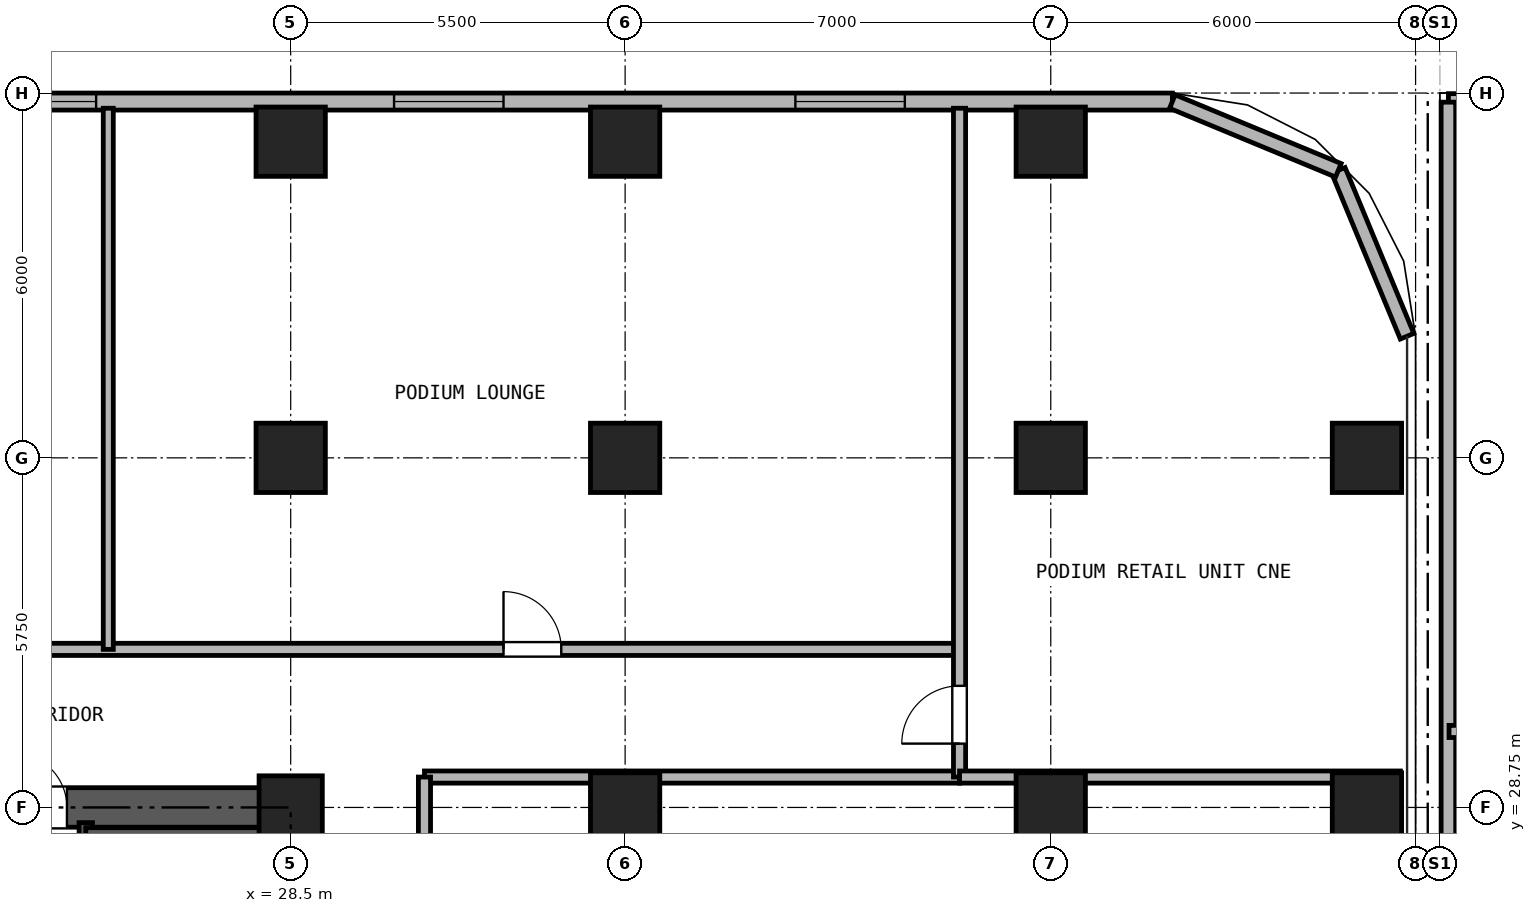
"""IFC4 building model, lengths in metres.
Left out: names, types, materials, properties, quantities, classifications, styles, units other than length and angle.
Written with IfcOpenShell. Run it as: python <this file> out.ifc"""

import sys

from ifc_helpers import new_model, si_unit, direction, frame, frame_2d, origin, origin_2d, place, context, subcontext, project, spatial, rectangle, hollow_rectangle, extrude, source, transform, mapped, element, fill, save


model = new_model("IFC4")
c1 = context("Model", 3, precision=1e-05, world=origin(), true_north=direction((0.0, 1.0)))
c2 = subcontext(c1, "Body", "Model", "MODEL_VIEW")
j1 = project(units=[si_unit("LENGTHUNIT", "METRE"), si_unit("PLANEANGLEUNIT", "RADIAN")], contexts=[c1])
p1 = place(None, origin())
s1 = spatial("IfcSite", under=j1, at=p1, CompositionType="ELEMENT")
p2 = place(p1, origin())
s2 = spatial("IfcBuilding", under=s1, at=p2, CompositionType="ELEMENT")
p3 = place(p2, frame((0.0, 0.0, 4.5)))
s3 = spatial("IfcBuildingStorey", under=s2, at=p3, CompositionType="ELEMENT", Elevation=4.5)
m1 = source(origin(), c2, "Body", "SweptSolid", [
    extrude(hollow_rectangle(XDim=1.14, YDim=1.14, WallThickness=0.07, at=origin_2d()), origin(), (0.0, 0.0, 1.0), 4.18),
])
for number, where, z_axis, x_axis in (
    (1, (28.5, 39.7, 0.0), (0.0, 0.0, 1.0), (1.0, 0.0, 0.0)),
    (2, (34.0, 39.7, 0.0), (0.0, 0.0, 1.0), (1.0, 0.0, 0.0)),
    (3, (41.0, 39.7, 0.0), (0.0, 0.0, 1.0), (1.0, 0.0, 0.0)),
    (4, (46.2, 28.75, 0.0), (0.0, 0.0, 1.0), (1.0, 0.0, 0.0)),
    (5, (46.2, 34.5, 0.0), (0.0, 0.0, 1.0), (1.0, 0.0, 0.0)),
):
    element("IfcColumn", number, at=place(p3, frame(where, z_axis=z_axis, x_axis=x_axis)), inside=s3, PredefinedType="COLUMN", context=c2, shape_type="MappedRepresentation", body=[
        mapped(m1, transform((0.0, 0.0, 0.0), x_axis=(1.0, 0.0, 0.0), y_axis=(0.0, 1.0, 0.0), z_axis=(0.0, 0.0, 1.0), scale=1.0)),
    ])
m2 = source(origin(), c2, "Body", "SweptSolid", [
    extrude(hollow_rectangle(XDim=1.04, YDim=1.04, WallThickness=0.065, at=origin_2d()), origin(), (0.0, 0.0, 1.0), 4.18),
])
p4 = place(p3, frame((28.5, 28.75, 0.0), z_axis=(0.0, 0.0, 1.0), x_axis=(1.0, 0.0, 0.0)))
e6 = element("IfcColumn", 6, at=p4, inside=s3, PredefinedType="COLUMN", context=c2, shape_type="MappedRepresentation", body=[
    mapped(m2, transform((0.0, 0.0, 0.0), x_axis=(1.0, 0.0, 0.0), y_axis=(0.0, 1.0, 0.0), z_axis=(0.0, 0.0, 1.0), scale=1.0)),
])
for number, where, z_axis, x_axis in (
    (7, (28.5, 34.5, 0.0), (0.0, 0.0, 1.0), (1.0, 0.0, 0.0)),
    (8, (34.0, 28.75, 0.0), (0.0, 0.0, 1.0), (1.0, 0.0, 0.0)),
    (9, (34.0, 34.5, 0.0), (0.0, 0.0, 1.0), (1.0, 0.0, 0.0)),
    (10, (41.0, 28.75, 0.0), (0.0, 0.0, 1.0), (1.0, 0.0, 0.0)),
    (11, (41.0, 34.5, 0.0), (0.0, 0.0, 1.0), (1.0, 0.0, 0.0)),
):
    element("IfcColumn", number, at=place(p3, frame(where, z_axis=z_axis, x_axis=x_axis)), inside=s3, PredefinedType="COLUMN", context=c2, shape_type="MappedRepresentation", body=[
        mapped(m1, transform((0.0, 0.0, 0.0), x_axis=(1.0, 0.0, 0.0), y_axis=(0.0, 1.0, 0.0), z_axis=(0.0, 0.0, 1.0), scale=1.0)),
    ])
p5 = place(p3, frame((4.0, 40.36, 0.0), z_axis=(0.0, 0.0, 1.0), x_axis=(1.0, 0.0, 0.0)))
e12 = element("IfcWall", 12, at=p5, inside=s3, PredefinedType="SOLIDWALL", context=c2, shape_type="SweptSolid", body=[
    extrude(rectangle(XDim=39.0, YDim=0.28, at=frame_2d((19.5, 0.0))), origin(), (0.0, 0.0, 1.0), 4.18),
])
p6 = place(p5, frame((4.0, 0.0, 0.9)))
e13 = element("IfcOpeningElement", 13, at=p6, cuts=e12, PredefinedType="OPENING", context=c2, shape_type="SweptSolid", body=[
    extrude(rectangle(XDim=1.8, YDim=2.1, at=frame_2d((0.9, 1.05))), frame((0.0, 0.15, 0.0), z_axis=(0.0, -1.0, 0.0), x_axis=(1.0, 0.0, 0.0)), (0.0, 0.0, 1.0), 0.3),
])
p7 = place(p5, frame((11.2, 0.0, 0.9)))
e14 = element("IfcOpeningElement", 14, at=p7, cuts=e12, PredefinedType="OPENING", context=c2, shape_type="SweptSolid", body=[
    extrude(rectangle(XDim=1.8, YDim=2.1, at=frame_2d((0.9, 1.05))), frame((0.0, 0.15, 0.0), z_axis=(0.0, -1.0, 0.0), x_axis=(1.0, 0.0, 0.0)), (0.0, 0.0, 1.0), 0.3),
])
p8 = place(p5, frame((19.5, 0.0, 0.9)))
e15 = element("IfcOpeningElement", 15, at=p8, cuts=e12, PredefinedType="OPENING", context=c2, shape_type="SweptSolid", body=[
    extrude(rectangle(XDim=1.8, YDim=2.1, at=frame_2d((0.9, 1.05))), frame((0.0, 0.15, 0.0), z_axis=(0.0, -1.0, 0.0), x_axis=(1.0, 0.0, 0.0)), (0.0, 0.0, 1.0), 0.3),
])
p9 = place(p5, frame((26.2, 0.0, 0.9)))
e16 = element("IfcOpeningElement", 16, at=p9, cuts=e12, PredefinedType="OPENING", context=c2, shape_type="SweptSolid", body=[
    extrude(rectangle(XDim=1.8, YDim=2.1, at=frame_2d((0.9, 1.05))), frame((0.0, 0.15, 0.0), z_axis=(0.0, -1.0, 0.0), x_axis=(1.0, 0.0, 0.0)), (0.0, 0.0, 1.0), 0.3),
])
p10 = place(p5, frame((32.8, 0.0, 0.9)))
e17 = element("IfcOpeningElement", 17, at=p10, cuts=e12, PredefinedType="OPENING", context=c2, shape_type="SweptSolid", body=[
    extrude(rectangle(XDim=1.8, YDim=2.1, at=frame_2d((0.9, 1.05))), frame((0.0, 0.15, 0.0), z_axis=(0.0, -1.0, 0.0), x_axis=(1.0, 0.0, 0.0)), (0.0, 0.0, 1.0), 0.3),
])
for number, where, z_axis, x_axis in (
    (18, (46.86, 36.5, 0.0), (0.0, 0.0, 1.0), (-0.383, 0.924, 0.0)),
    (19, (45.729, 39.229, 0.0), (0.0, 0.0, 1.0), (-0.924, 0.383, 0.0)),
):
    element("IfcWall", number, at=place(p3, frame(where, z_axis=z_axis, x_axis=x_axis)), inside=s3, PredefinedType="SOLIDWALL", context=c2, shape_type="SweptSolid", body=[
        extrude(rectangle(XDim=2.954, YDim=0.24, at=frame_2d((1.477, 0.0))), origin(), (0.0, 0.0, 1.0), 4.18),
    ])
p11 = place(p3, frame((47.54, 40.35, 0.0), z_axis=(0.0, 0.0, 1.0), x_axis=(1.0, 0.0, 0.0)))
e20 = element("IfcWall", 20, at=p11, inside=s3, PredefinedType="SOLIDWALL", context=c2, shape_type="SweptSolid", body=[
    extrude(rectangle(XDim=23.91, YDim=0.28, at=frame_2d((11.955, 0.0))), origin(), (0.0, 0.0, 1.0), 4.18),
])
p12 = place(p11, frame((6.01, 0.0, 1.1)))
e21 = element("IfcOpeningElement", 21, at=p12, cuts=e20, PredefinedType="OPENING", context=c2, shape_type="SweptSolid", body=[
    extrude(rectangle(XDim=0.9, YDim=1.5, at=frame_2d((0.45, 0.75))), frame((0.0, 0.15, 0.0), z_axis=(0.0, -1.0, 0.0), x_axis=(1.0, 0.0, 0.0)), (0.0, 0.0, 1.0), 0.3),
])
p13 = place(p3, frame((47.54, -0.54, 0.0), z_axis=(0.0, 0.0, 1.0), x_axis=(0.0, 1.0, 0.0)))
e22 = element("IfcWall", 22, at=p13, inside=s3, PredefinedType="SOLIDWALL", context=c2, shape_type="SweptSolid", body=[
    extrude(rectangle(XDim=40.89, YDim=0.24, at=frame_2d((20.445, 0.0))), origin(), (0.0, 0.0, 1.0), 4.18),
])
p14 = place(p3, frame((18.175, 28.75, 0.0), z_axis=(0.0, 0.0, 1.0), x_axis=(1.0, 0.0, 0.0)))
e23 = element("IfcWall", 23, at=p14, inside=s3, PredefinedType="SHEAR", context=c2, shape_type="SweptSolid", body=[
    extrude(rectangle(XDim=10.65, YDim=0.65, at=frame_2d((5.325, 0.0))), origin(), (0.0, 0.0, 1.0), 4.18),
])
p15 = place(p14, frame((4.205, 0.0, 0.0)))
e24 = element("IfcOpeningElement", 24, at=p15, cuts=e23, PredefinedType="OPENING", context=c2, shape_type="SweptSolid", body=[
    extrude(rectangle(XDim=0.9, YDim=2.05, at=frame_2d((0.45, 1.025))), frame((0.0, 0.335, 0.0), z_axis=(0.0, -1.0, 0.0), x_axis=(1.0, 0.0, 0.0)), (0.0, 0.0, 1.0), 0.67),
])
p16 = place(p14, frame((5.745, 0.0, 0.0)))
e25 = element("IfcOpeningElement", 25, at=p16, cuts=e23, PredefinedType="OPENING", context=c2, shape_type="SweptSolid", body=[
    extrude(rectangle(XDim=0.9, YDim=2.05, at=frame_2d((0.45, 1.025))), frame((0.0, 0.335, 0.0), z_axis=(0.0, -1.0, 0.0), x_axis=(1.0, 0.0, 0.0)), (0.0, 0.0, 1.0), 0.67),
])
p17 = place(p3, frame((28.5, 11.825, 0.0), z_axis=(0.0, 0.0, 1.0), x_axis=(0.0, 1.0, 0.0)))
e26 = element("IfcWall", 26, at=p17, inside=s3, PredefinedType="SHEAR", context=c2, shape_type="SweptSolid", body=[
    extrude(rectangle(XDim=16.6, YDim=0.65, at=frame_2d((8.3, 0.0))), origin(), (0.0, 0.0, 1.0), 4.18),
])
p18 = place(p17, frame((7.325, 0.0, 0.0)))
e27 = element("IfcOpeningElement", 27, at=p18, cuts=e26, PredefinedType="OPENING", context=c2, shape_type="SweptSolid", body=[
    extrude(rectangle(XDim=1.15, YDim=2.2, at=frame_2d((0.575, 1.1))), frame((0.0, 0.335, 0.0), z_axis=(0.0, -1.0, 0.0), x_axis=(1.0, 0.0, 0.0)), (0.0, 0.0, 1.0), 0.67),
])
p19 = place(p3, frame((25.13, 21.39, 0.0), z_axis=(0.0, 0.0, 1.0), x_axis=(0.0, 1.0, 0.0)))
e28 = element("IfcWall", 28, at=p19, inside=s3, PredefinedType="SOLIDWALL", context=c2, shape_type="SweptSolid", body=[
    extrude(rectangle(XDim=7.11, YDim=0.22, at=frame_2d((3.555, 0.0))), origin(), (0.0, 0.0, 1.0), 4.18),
])
p20 = place(p3, frame((25.13, 28.335, 0.0), z_axis=(0.0, 0.0, 1.0), x_axis=(1.0, 0.0, 0.0)))
e29 = element("IfcWall", 29, at=p20, inside=s3, PredefinedType="PARTITIONING", context=c2, shape_type="SweptSolid", body=[
    extrude(rectangle(XDim=3.035, YDim=0.165, at=frame_2d((1.518, 0.0))), origin(), (0.0, 0.0, 1.0), 4.18),
])
p21 = place(p3, frame((7.5, 31.35, 0.0), z_axis=(0.0, 0.0, 1.0), x_axis=(1.0, 0.0, 0.0)))
e30 = element("IfcWall", 30, at=p21, inside=s3, PredefinedType="PARTITIONING", context=c2, shape_type="SweptSolid", body=[
    extrude(rectangle(XDim=32.0, YDim=0.2, at=frame_2d((16.0, 0.0))), origin(), (0.0, 0.0, 1.0), 4.18),
])
p22 = place(p21, frame((8.5, 0.0, 0.0)))
e31 = element("IfcOpeningElement", 31, at=p22, cuts=e30, PredefinedType="OPENING", context=c2, shape_type="SweptSolid", body=[
    extrude(rectangle(XDim=0.95, YDim=2.15, at=frame_2d((0.475, 1.075))), frame((0.0, 0.11, 0.0), z_axis=(0.0, -1.0, 0.0), x_axis=(1.0, 0.0, 0.0)), (0.0, 0.0, 1.0), 0.22),
])
p23 = place(p21, frame((24.5, 0.0, 0.0)))
e32 = element("IfcOpeningElement", 32, at=p23, cuts=e30, PredefinedType="OPENING", context=c2, shape_type="SweptSolid", body=[
    extrude(rectangle(XDim=0.95, YDim=2.15, at=frame_2d((0.475, 1.075))), frame((0.0, 0.11, 0.0), z_axis=(0.0, -1.0, 0.0), x_axis=(1.0, 0.0, 0.0)), (0.0, 0.0, 1.0), 0.22),
])
p24 = place(p3, frame((30.7, 29.25, 0.0), z_axis=(0.0, 0.0, 1.0), x_axis=(1.0, 0.0, 0.0)))
e33 = element("IfcWall", 33, at=p24, inside=s3, PredefinedType="PARTITIONING", context=c2, shape_type="SweptSolid", body=[
    extrude(rectangle(XDim=8.8, YDim=0.2, at=frame_2d((4.4, 0.0))), origin(), (0.0, 0.0, 1.0), 4.18),
])
p25 = place(p3, frame((30.7, 11.0, 0.0), z_axis=(0.0, 0.0, 1.0), x_axis=(0.0, 1.0, 0.0)))
e34 = element("IfcWall", 34, at=p25, inside=s3, PredefinedType="PARTITIONING", context=c2, shape_type="SweptSolid", body=[
    extrude(rectangle(XDim=18.25, YDim=0.2, at=frame_2d((9.125, 0.0))), origin(), (0.0, 0.0, 1.0), 4.18),
])
p26 = place(p25, frame((8.625, 0.0, 0.0)))
e35 = element("IfcOpeningElement", 35, at=p26, cuts=e34, PredefinedType="OPENING", context=c2, shape_type="SweptSolid", body=[
    extrude(rectangle(XDim=0.95, YDim=2.15, at=frame_2d((0.475, 1.075))), frame((0.0, 0.11, 0.0), z_axis=(0.0, -1.0, 0.0), x_axis=(1.0, 0.0, 0.0)), (0.0, 0.0, 1.0), 0.22),
])
p27 = place(p3, frame((39.5, 29.25, 0.0), z_axis=(0.0, 0.0, 1.0), x_axis=(0.0, 1.0, 0.0)))
e36 = element("IfcWall", 36, at=p27, inside=s3, PredefinedType="PARTITIONING", context=c2, shape_type="SweptSolid", body=[
    extrude(rectangle(XDim=11.0, YDim=0.2, at=frame_2d((5.5, 0.0))), origin(), (0.0, 0.0, 1.0), 4.18),
])
p28 = place(p27, frame((0.55, 0.0, 0.0)))
e37 = element("IfcOpeningElement", 37, at=p28, cuts=e36, PredefinedType="OPENING", context=c2, shape_type="SweptSolid", body=[
    extrude(rectangle(XDim=0.95, YDim=2.15, at=frame_2d((0.475, 1.075))), frame((0.0, 0.11, 0.0), z_axis=(0.0, -1.0, 0.0), x_axis=(1.0, 0.0, 0.0)), (0.0, 0.0, 1.0), 0.22),
])
p29 = place(p3, frame((39.5, 29.25, 0.0), z_axis=(0.0, 0.0, 1.0), x_axis=(1.0, 0.0, 0.0)))
e38 = element("IfcWall", 38, at=p29, inside=s3, PredefinedType="PARTITIONING", context=c2, shape_type="SweptSolid", body=[
    extrude(rectangle(XDim=7.25, YDim=0.2, at=frame_2d((3.625, 0.0))), origin(), (0.0, 0.0, 1.0), 4.18),
])
p30 = place(p3, frame((25.5, 31.35, 0.0), z_axis=(0.0, 0.0, 1.0), x_axis=(0.0, 1.0, 0.0)))
e39 = element("IfcWall", 39, at=p30, inside=s3, PredefinedType="PARTITIONING", context=c2, shape_type="SweptSolid", body=[
    extrude(rectangle(XDim=8.9, YDim=0.165, at=frame_2d((4.45, 0.0))), origin(), (0.0, 0.0, 1.0), 4.18),
])
p31 = place(p3, frame((47.55, 30.0, 0.0), z_axis=(0.0, 0.0, 1.0), x_axis=(1.0, 0.0, 0.0)))
e40 = element("IfcWall", 40, at=p31, inside=s3, PredefinedType="PARTITIONING", context=c2, shape_type="SweptSolid", body=[
    extrude(rectangle(XDim=23.9, YDim=0.2, at=frame_2d((11.95, 0.0))), origin(), (0.0, 0.0, 1.0), 4.18),
])
p32 = place(p31, frame((3.45, 0.0, 0.0)))
e41 = element("IfcOpeningElement", 41, at=p32, cuts=e40, PredefinedType="OPENING", context=c2, shape_type="SweptSolid", body=[
    extrude(rectangle(XDim=1.0, YDim=2.1, at=frame_2d((0.5, 1.05))), frame((0.0, 0.11, 0.0), z_axis=(0.0, -1.0, 0.0), x_axis=(1.0, 0.0, 0.0)), (0.0, 0.0, 1.0), 0.22),
])
p33 = place(p8, origin())
e42 = element("IfcWindow", 42, at=p33, inside=s3, PartitioningType="SINGLE_PANEL", PredefinedType="WINDOW", context=c2, shape_type="SweptSolid", body=[
    extrude(rectangle(XDim=1.8, YDim=2.1, at=frame_2d((0.9, 1.05))), frame((0.0, 0.03, 0.0), z_axis=(0.0, -1.0, 0.0), x_axis=(1.0, 0.0, 0.0)), (0.0, 0.0, 1.0), 0.06),
])
fill(e15, e42)
p34 = place(p9, origin())
e43 = element("IfcWindow", 43, at=p34, inside=s3, PartitioningType="SINGLE_PANEL", PredefinedType="WINDOW", context=c2, shape_type="SweptSolid", body=[
    extrude(rectangle(XDim=1.8, YDim=2.1, at=frame_2d((0.9, 1.05))), frame((0.0, 0.03, 0.0), z_axis=(0.0, -1.0, 0.0), x_axis=(1.0, 0.0, 0.0)), (0.0, 0.0, 1.0), 0.06),
])
fill(e16, e43)
p35 = place(p10, origin())
e44 = element("IfcWindow", 44, at=p35, inside=s3, PartitioningType="SINGLE_PANEL", PredefinedType="WINDOW", context=c2, shape_type="SweptSolid", body=[
    extrude(rectangle(XDim=1.8, YDim=2.1, at=frame_2d((0.9, 1.05))), frame((0.0, 0.03, 0.0), z_axis=(0.0, -1.0, 0.0), x_axis=(1.0, 0.0, 0.0)), (0.0, 0.0, 1.0), 0.06),
])
fill(e17, e44)
p36 = place(p16, origin())
e45 = element("IfcDoor", 45, at=p36, inside=s3, OperationType="SINGLE_SWING_LEFT", PredefinedType="DOOR", context=c2, shape_type="SweptSolid", body=[
    extrude(rectangle(XDim=0.9, YDim=2.05, at=frame_2d((0.45, 1.025))), frame((0.0, 0.025, 0.0), z_axis=(0.0, -1.0, 0.0), x_axis=(1.0, 0.0, 0.0)), (0.0, 0.0, 1.0), 0.05),
])
fill(e25, e45)
p37 = place(p23, origin())
e46 = element("IfcDoor", 46, at=p37, inside=s3, OperationType="SINGLE_SWING_LEFT", PredefinedType="DOOR", context=c2, shape_type="SweptSolid", body=[
    extrude(rectangle(XDim=0.95, YDim=2.15, at=frame_2d((0.475, 1.075))), frame((0.0, 0.025, 0.0), z_axis=(0.0, -1.0, 0.0), x_axis=(1.0, 0.0, 0.0)), (0.0, 0.0, 1.0), 0.05),
])
fill(e32, e46)
p38 = place(p28, origin())
e47 = element("IfcDoor", 47, at=p38, inside=s3, OperationType="SINGLE_SWING_LEFT", PredefinedType="DOOR", context=c2, shape_type="SweptSolid", body=[
    extrude(rectangle(XDim=0.95, YDim=2.15, at=frame_2d((0.475, 1.075))), frame((0.0, 0.025, 0.0), z_axis=(0.0, -1.0, 0.0), x_axis=(1.0, 0.0, 0.0)), (0.0, 0.0, 1.0), 0.05),
])
fill(e37, e47)
save(model, sys.argv[1])
